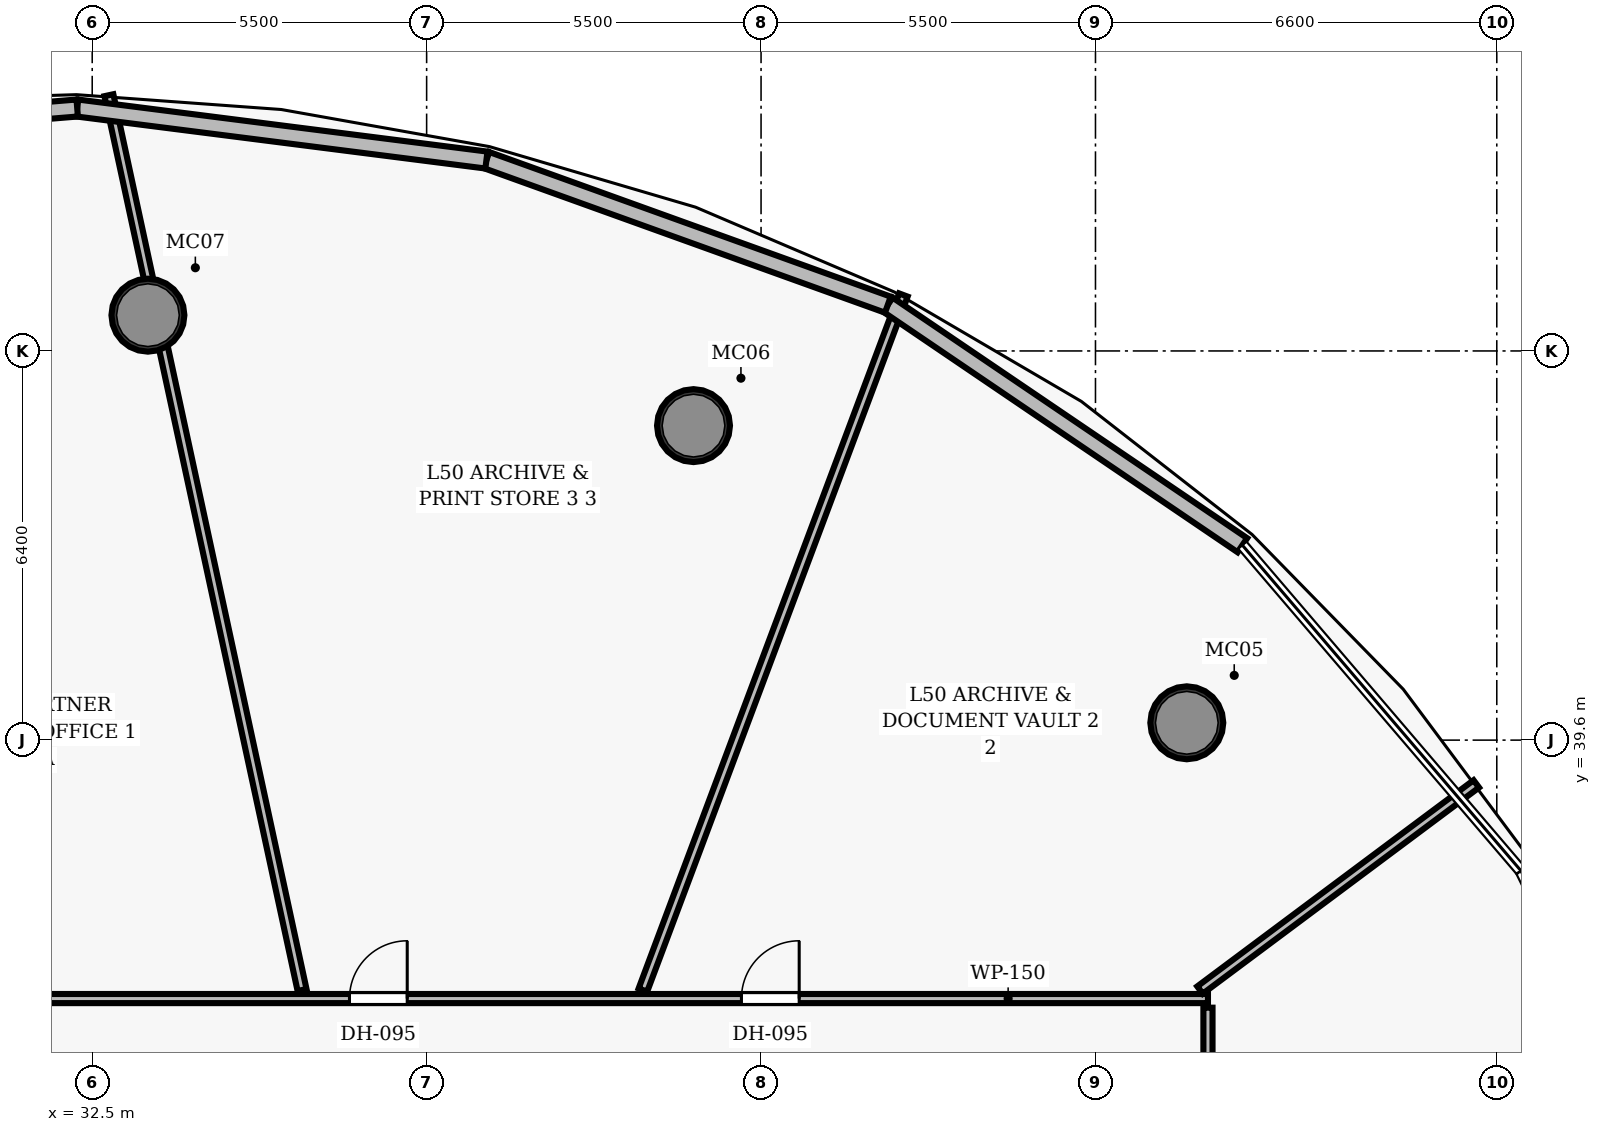
"""IFC4 building model, lengths in metres.
Left out: names, types, materials, properties, quantities, classifications, styles, units other than length and angle.
Written with IfcOpenShell. Run it as: python <this file> out.ifc"""

import sys

from ifc_helpers import new_model, si_unit, direction, frame, frame_2d, origin, origin_2d, place, context, subcontext, project, spatial, rectangle, hollow_circle, extrude, element, fill, save


model = new_model("IFC4")
c1 = context("Model", 3, precision=1e-05, world=origin(), true_north=direction((0.0, 1.0)))
c2 = subcontext(c1, "Body", "Model", "MODEL_VIEW")
j1 = project(units=[si_unit("LENGTHUNIT", "METRE"), si_unit("PLANEANGLEUNIT", "RADIAN")], contexts=[c1])
p1 = place(None, origin())
s1 = spatial("IfcSite", under=j1, at=p1, CompositionType="ELEMENT")
p2 = place(p1, origin())
s2 = spatial("IfcBuilding", under=s1, at=p2, CompositionType="ELEMENT")
p3 = place(p2, frame((0.0, 0.0, 198.15)))
s3 = spatial("IfcBuildingStorey", under=s2, at=p3, CompositionType="ELEMENT", Elevation=198.15)
for number, where, z_axis, x_axis in (
    (1, (50.502, 39.885, 0.0), (0.0, 0.0, 1.0), (1.0, 0.0, 0.0)),
    (2, (42.389, 44.772, 0.0), (0.0, 0.0, 1.0), (1.0, 0.0, 0.0)),
    (3, (33.416, 46.588, 0.0), (0.0, 0.0, 1.0), (1.0, 0.0, 0.0)),
):
    element("IfcColumn", number, at=place(p3, frame(where, z_axis=z_axis, x_axis=x_axis)), inside=s3, PredefinedType="COLUMN", context=c2, shape_type="SweptSolid", body=[
        extrude(hollow_circle(Radius=0.6, WallThickness=0.05, at=origin_2d()), origin(), (0.0, 0.0, 1.0), 3.85),
    ])
p4 = place(p3, frame((24.85, 35.35, 0.0), z_axis=(0.0, 0.0, 1.0), x_axis=(1.0, 0.0, 0.0)))
e4 = element("IfcWall", 4, at=p4, inside=s3, PredefinedType="PARTITIONING", context=c2, shape_type="SweptSolid", body=[
    extrude(rectangle(XDim=26.0, YDim=0.15, at=frame_2d((13.0, 0.0))), origin(), (0.0, 0.0, 1.0), 3.035),
])
p5 = place(p4, frame((18.327, 0.0, 0.0)))
e5 = element("IfcOpeningElement", 5, at=p5, cuts=e4, PredefinedType="OPENING", context=c2, shape_type="SweptSolid", body=[
    extrude(rectangle(XDim=0.95, YDim=2.15, at=frame_2d((0.475, 1.075))), frame((0.0, 0.085, 0.0), z_axis=(0.0, -1.0, 0.0), x_axis=(1.0, 0.0, 0.0)), (0.0, 0.0, 1.0), 0.17),
])
p6 = place(p4, frame((11.881, 0.0, 0.0)))
e6 = element("IfcOpeningElement", 6, at=p6, cuts=e4, PredefinedType="OPENING", context=c2, shape_type="SweptSolid", body=[
    extrude(rectangle(XDim=0.95, YDim=2.15, at=frame_2d((0.475, 1.075))), frame((0.0, 0.085, 0.0), z_axis=(0.0, -1.0, 0.0), x_axis=(1.0, 0.0, 0.0)), (0.0, 0.0, 1.0), 0.17),
])
p7 = place(p4, frame((5.711, 0.0, 0.0)))
e7 = element("IfcOpeningElement", 7, at=p7, cuts=e4, PredefinedType="OPENING", context=c2, shape_type="SweptSolid", body=[
    extrude(rectangle(XDim=0.95, YDim=2.15, at=frame_2d((0.475, 1.075))), frame((0.0, 0.085, 0.0), z_axis=(0.0, -1.0, 0.0), x_axis=(1.0, 0.0, 0.0)), (0.0, 0.0, 1.0), 0.17),
])
p8 = place(p4, frame((1.528, 0.0, 0.0)))
e8 = element("IfcOpeningElement", 8, at=p8, cuts=e4, PredefinedType="OPENING", context=c2, shape_type="SweptSolid", body=[
    extrude(rectangle(XDim=0.95, YDim=2.15, at=frame_2d((0.475, 1.075))), frame((0.0, 0.085, 0.0), z_axis=(0.0, -1.0, 0.0), x_axis=(1.0, 0.0, 0.0)), (0.0, 0.0, 1.0), 0.17),
])
p9 = place(p3, frame((50.85, 27.08, 0.0), z_axis=(0.0, 0.0, 1.0), x_axis=(0.0, 1.0, 0.0)))
e9 = element("IfcWall", 9, at=p9, inside=s3, PredefinedType="PARTITIONING", context=c2, shape_type="SweptSolid", body=[
    extrude(rectangle(XDim=8.12, YDim=0.15, at=frame_2d((4.06, 0.0))), origin(), (0.0, 0.0, 1.0), 3.035),
])
p10 = place(p9, frame((1.555, 0.0, 0.0)))
e10 = element("IfcOpeningElement", 10, at=p10, cuts=e9, PredefinedType="OPENING", context=c2, shape_type="SweptSolid", body=[
    extrude(rectangle(XDim=0.95, YDim=2.15, at=frame_2d((0.475, 1.075))), frame((0.0, 0.085, 0.0), z_axis=(0.0, -1.0, 0.0), x_axis=(1.0, 0.0, 0.0)), (0.0, 0.0, 1.0), 0.17),
])
p11 = place(p3, frame((50.719, 35.49, 0.0), z_axis=(0.0, 0.0, 1.0), x_axis=(0.801485791148, 0.598013818057, 0.0)))
e11 = element("IfcWall", 11, at=p11, inside=s3, PredefinedType="PARTITIONING", context=c2, shape_type="SweptSolid", body=[
    extrude(rectangle(XDim=5.669, YDim=0.15, at=frame_2d((2.835, 0.0))), origin(), (0.0, 0.0, 1.0), 3.035),
])
p12 = place(p3, frame((41.557, 35.49, 0.0), z_axis=(0.0, 0.0, 1.0), x_axis=(0.350952470756, 0.936393273828, 0.0)))
e12 = element("IfcWall", 12, at=p12, inside=s3, PredefinedType="PARTITIONING", context=c2, shape_type="SweptSolid", body=[
    extrude(rectangle(XDim=12.207, YDim=0.15, at=frame_2d((6.103, 0.0))), origin(), (0.0, 0.0, 1.0), 3.035),
])
p13 = place(p3, frame((35.951, 35.49, 0.0), z_axis=(0.0, 0.0, 1.0), x_axis=(-0.211025031092, 0.977480657738, 0.0)))
e13 = element("IfcWall", 13, at=p13, inside=s3, PredefinedType="PARTITIONING", context=c2, shape_type="SweptSolid", body=[
    extrude(rectangle(XDim=15.055, YDim=0.15, at=frame_2d((7.528, 0.0))), origin(), (0.0, 0.0, 1.0), 3.035),
])
p14 = place(p3, frame((45.586, 46.761, 0.0), z_axis=(0.0, 0.0, 1.0), x_axis=(0.827523497292, -0.561431083419, 0.0)))
e14 = element("IfcWall", 14, at=p14, inside=s3, PredefinedType="SOLIDWALL", context=c2, shape_type="SweptSolid", body=[
    extrude(rectangle(XDim=7.045, YDim=0.28, at=frame_2d((3.523, 0.0))), origin(), (0.0, 0.0, 1.0), 3.62),
])
p15 = place(p3, frame((38.983, 49.139, 0.0), z_axis=(0.0, 0.0, 1.0), x_axis=(0.940815101007, -0.338920264542, 0.0)))
e15 = element("IfcWall", 15, at=p15, inside=s3, PredefinedType="SOLIDWALL", context=c2, shape_type="SweptSolid", body=[
    extrude(rectangle(XDim=7.018, YDim=0.28, at=frame_2d((3.509, 0.0))), origin(), (0.0, 0.0, 1.0), 3.62),
])
p16 = place(p3, frame((32.253, 49.995, 0.0), z_axis=(0.0, 0.0, 1.0), x_axis=(0.992013801187, -0.126129371102, 0.0)))
e16 = element("IfcWall", 16, at=p16, inside=s3, PredefinedType="SOLIDWALL", context=c2, shape_type="SweptSolid", body=[
    extrude(rectangle(XDim=6.784, YDim=0.28, at=frame_2d((3.392, 0.0))), origin(), (0.0, 0.0, 1.0), 3.62),
])
p17 = place(p3, frame((26.047, 49.487, 0.0), z_axis=(0.0, 0.0, 1.0), x_axis=(0.996668763865, 0.08155596321, 0.0)))
e17 = element("IfcWall", 17, at=p17, inside=s3, PredefinedType="SOLIDWALL", context=c2, shape_type="SweptSolid", body=[
    extrude(rectangle(XDim=6.227, YDim=0.28, at=frame_2d((3.113, 0.0))), origin(), (0.0, 0.0, 1.0), 3.62),
])
p18 = place(p5, origin())
e18 = element("IfcDoor", 18, at=p18, inside=s3, OperationType="SINGLE_SWING_RIGHT", PredefinedType="DOOR", context=c2, shape_type="SweptSolid", body=[
    extrude(rectangle(XDim=0.95, YDim=2.15, at=frame_2d((0.475, 1.075))), frame((0.0, 0.025, 0.0), z_axis=(0.0, -1.0, 0.0), x_axis=(1.0, 0.0, 0.0)), (0.0, 0.0, 1.0), 0.05),
])
fill(e5, e18)
p19 = place(p6, origin())
e19 = element("IfcDoor", 19, at=p19, inside=s3, OperationType="SINGLE_SWING_RIGHT", PredefinedType="DOOR", context=c2, shape_type="SweptSolid", body=[
    extrude(rectangle(XDim=0.95, YDim=2.15, at=frame_2d((0.475, 1.075))), frame((0.0, 0.025, 0.0), z_axis=(0.0, -1.0, 0.0), x_axis=(1.0, 0.0, 0.0)), (0.0, 0.0, 1.0), 0.05),
])
fill(e6, e19)
save(model, sys.argv[1])
